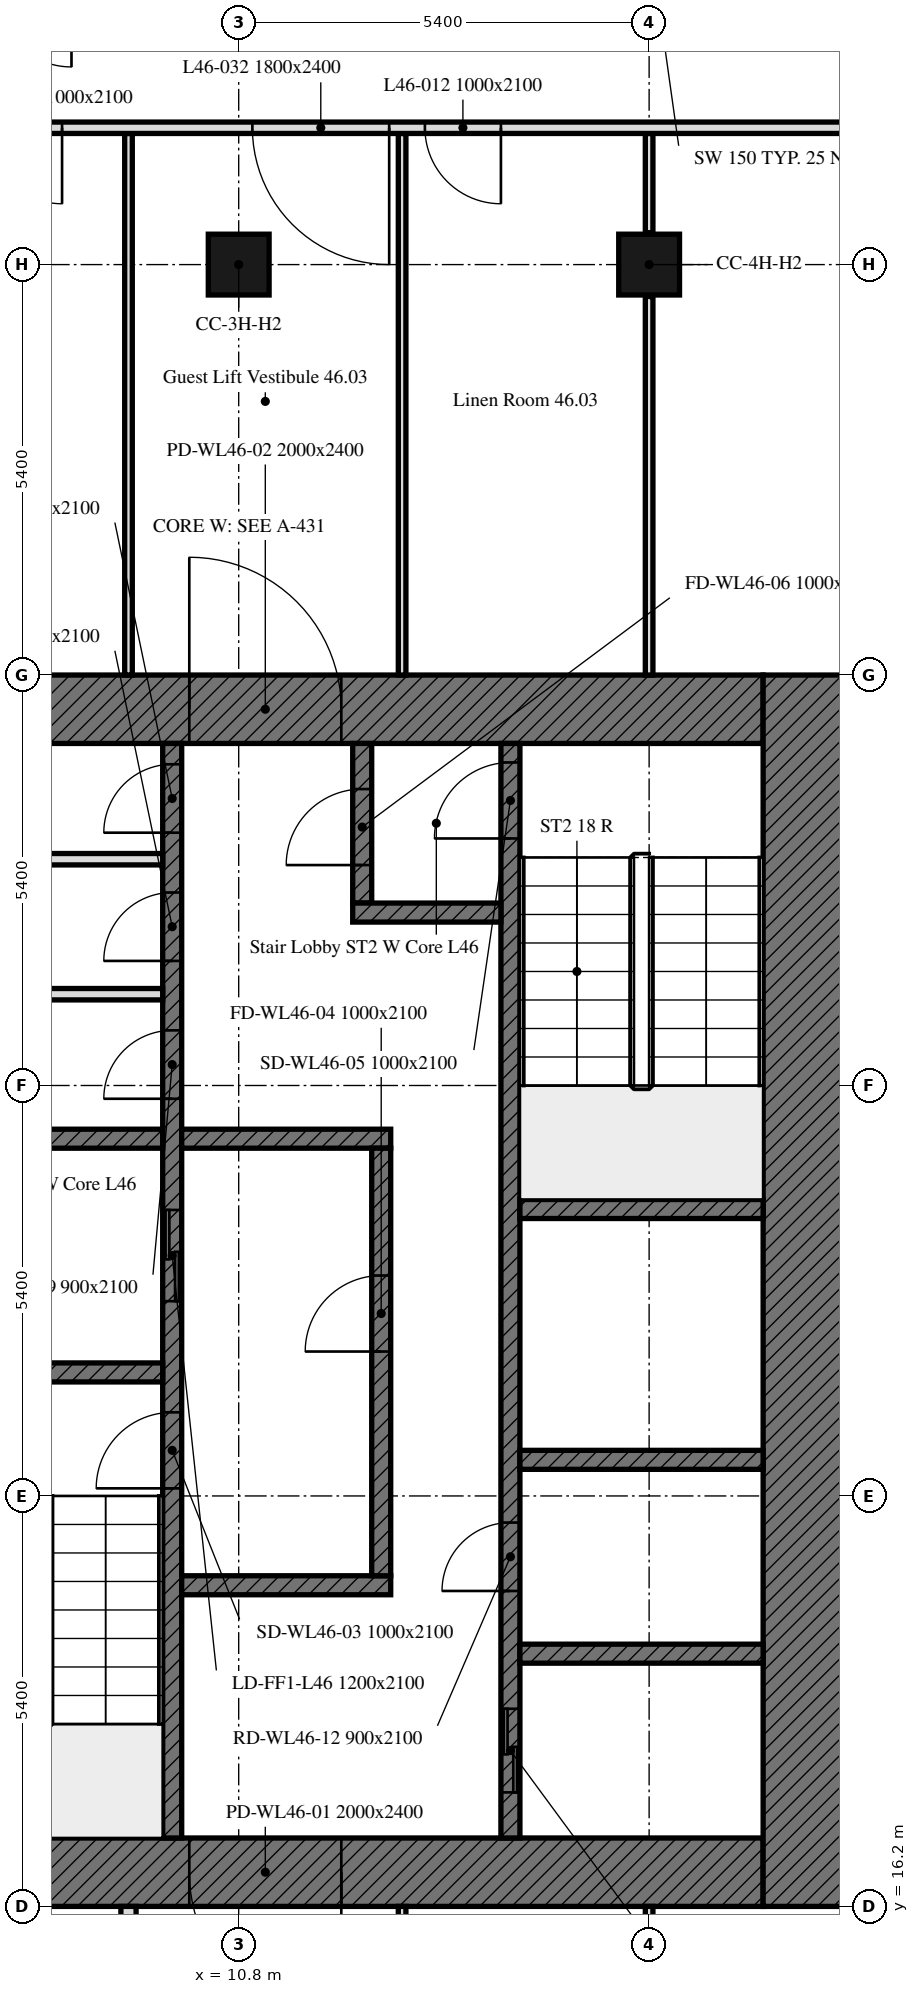
"""IFC4 building model, lengths in metres.
Left out: names, types, materials, properties, quantities, classifications, styles, units other than length and angle.
Written with IfcOpenShell. Run it as: python <this file> out.ifc"""

import sys

from ifc_helpers import new_model, si_unit, direction, frame, frame_2d, origin, origin_2d, place, context, subcontext, project, spatial, rectangle, extrude, element, fill, save


model = new_model("IFC4")
c1 = context("Model", 3, precision=1e-05, world=origin(), true_north=direction((0.0, 1.0)))
c2 = subcontext(c1, "Body", "Model", "MODEL_VIEW")
j1 = project(units=[si_unit("LENGTHUNIT", "METRE"), si_unit("PLANEANGLEUNIT", "RADIAN")], contexts=[c1])
p1 = place(None, origin())
s1 = spatial("IfcSite", under=j1, at=p1, CompositionType="ELEMENT")
p2 = place(p1, origin())
s2 = spatial("IfcBuilding", under=s1, at=p2, CompositionType="ELEMENT")
p3 = place(p2, frame((0.0, 0.0, 190.6)))
s3 = spatial("IfcBuildingStorey", under=s2, at=p3, CompositionType="ELEMENT", Elevation=190.6)
for number, where, z_axis, x_axis in (
    (1, (10.8, 37.8, 0.0), (0.0, 0.0, 1.0), (1.0, 0.0, 0.0)),
    (2, (16.2, 37.8, 0.0), (0.0, 0.0, 1.0), (1.0, 0.0, 0.0)),
):
    element("IfcColumn", number, at=place(p3, frame(where, z_axis=z_axis, x_axis=x_axis)), inside=s3, PredefinedType="COLUMN", context=c2, shape_type="SweptSolid", body=[
        extrude(rectangle(XDim=0.8, YDim=0.8, at=origin_2d()), origin(), (0.0, 0.0, 1.0), 3.0),
    ])
p4 = place(p3, frame((17.7, 16.65, 0.0), z_axis=(0.0, 0.0, 1.0), x_axis=(-1.0, 0.0, 0.0)))
e3 = element("IfcWall", 3, at=p4, inside=s3, PredefinedType="SOLIDWALL", context=c2, shape_type="SweptSolid", body=[
    extrude(rectangle(XDim=11.1, YDim=0.9, at=frame_2d((5.55, 0.0))), origin(), (0.0, 0.0, 1.0), 3.0),
])
p5 = place(p4, frame((5.55, 0.0, 0.0)))
e4 = element("IfcOpeningElement", 4, at=p5, cuts=e3, PredefinedType="OPENING", context=c2, shape_type="SweptSolid", body=[
    extrude(rectangle(XDim=2.0, YDim=2.4, at=frame_2d((1.0, 1.2))), frame((0.0, 0.45, 0.0), z_axis=(0.0, -1.0, 0.0), x_axis=(1.0, 0.0, 0.0)), (0.0, 0.0, 1.0), 0.9),
])
p6 = place(p3, frame((6.6, 31.95, 0.0), z_axis=(0.0, 0.0, 1.0), x_axis=(1.0, 0.0, 0.0)))
e5 = element("IfcWall", 5, at=p6, inside=s3, PredefinedType="SOLIDWALL", context=c2, shape_type="SweptSolid", body=[
    extrude(rectangle(XDim=11.1, YDim=0.9, at=frame_2d((5.55, 0.0))), origin(), (0.0, 0.0, 1.0), 3.0),
])
p7 = place(p6, frame((3.55, 0.0, 0.0)))
e6 = element("IfcOpeningElement", 6, at=p7, cuts=e5, PredefinedType="OPENING", context=c2, shape_type="SweptSolid", body=[
    extrude(rectangle(XDim=2.0, YDim=2.4, at=frame_2d((1.0, 1.2))), frame((0.0, 0.45, 0.0), z_axis=(0.0, -1.0, 0.0), x_axis=(1.0, 0.0, 0.0)), (0.0, 0.0, 1.0), 0.9),
])
p8 = place(p3, frame((18.3, 32.4, 0.0), z_axis=(0.0, 0.0, 1.0), x_axis=(0.0, -1.0, 0.0)))
e7 = element("IfcWall", 7, at=p8, inside=s3, PredefinedType="SOLIDWALL", context=c2, shape_type="SweptSolid", body=[
    extrude(rectangle(XDim=16.2, YDim=1.2, at=frame_2d((8.1, 0.0))), origin(), (0.0, 0.0, 1.0), 3.0),
])
p9 = place(p3, frame((9.925, 17.1, 0.0), z_axis=(0.0, 0.0, 1.0), x_axis=(0.0, 1.0, 0.0)))
e8 = element("IfcWall", 8, at=p9, inside=s3, PredefinedType="SOLIDWALL", context=c2, shape_type="SweptSolid", body=[
    extrude(rectangle(XDim=14.4, YDim=0.25, at=frame_2d((7.2, 0.0))), origin(), (0.0, 0.0, 1.0), 3.0),
])
p10 = place(p9, frame((4.6, 0.0, 0.0)))
e9 = element("IfcOpeningElement", 9, at=p10, cuts=e8, PredefinedType="OPENING", context=c2, shape_type="SweptSolid", body=[
    extrude(rectangle(XDim=1.0, YDim=2.1, at=frame_2d((0.5, 1.05))), frame((0.0, 0.125, 0.0), z_axis=(0.0, -1.0, 0.0), x_axis=(1.0, 0.0, 0.0)), (0.0, 0.0, 1.0), 0.25),
])
p11 = place(p9, frame((7.062, 0.0, 0.0)))
e10 = element("IfcOpeningElement", 10, at=p11, cuts=e8, PredefinedType="OPENING", context=c2, shape_type="SweptSolid", body=[
    extrude(rectangle(XDim=1.2, YDim=2.1, at=frame_2d((0.6, 1.05))), frame((0.0, 0.125, 0.0), z_axis=(0.0, -1.0, 0.0), x_axis=(1.0, 0.0, 0.0)), (0.0, 0.0, 1.0), 0.25),
])
p12 = place(p9, frame((9.726, 0.0, 0.0)))
e11 = element("IfcOpeningElement", 11, at=p12, cuts=e8, PredefinedType="OPENING", context=c2, shape_type="SweptSolid", body=[
    extrude(rectangle(XDim=0.9, YDim=2.1, at=frame_2d((0.45, 1.05))), frame((0.0, 0.125, 0.0), z_axis=(0.0, -1.0, 0.0), x_axis=(1.0, 0.0, 0.0)), (0.0, 0.0, 1.0), 0.25),
])
p13 = place(p9, frame((11.539, 0.0, 0.0)))
e12 = element("IfcOpeningElement", 12, at=p13, cuts=e8, PredefinedType="OPENING", context=c2, shape_type="SweptSolid", body=[
    extrude(rectangle(XDim=0.9, YDim=2.1, at=frame_2d((0.45, 1.05))), frame((0.0, 0.125, 0.0), z_axis=(0.0, -1.0, 0.0), x_axis=(1.0, 0.0, 0.0)), (0.0, 0.0, 1.0), 0.25),
])
p14 = place(p9, frame((13.226, 0.0, 0.0)))
e13 = element("IfcOpeningElement", 13, at=p14, cuts=e8, PredefinedType="OPENING", context=c2, shape_type="SweptSolid", body=[
    extrude(rectangle(XDim=0.9, YDim=2.1, at=frame_2d((0.45, 1.05))), frame((0.0, 0.125, 0.0), z_axis=(0.0, -1.0, 0.0), x_axis=(1.0, 0.0, 0.0)), (0.0, 0.0, 1.0), 0.25),
])
p15 = place(p3, frame((14.375, 17.1, 0.0), z_axis=(0.0, 0.0, 1.0), x_axis=(0.0, 1.0, 0.0)))
e14 = element("IfcWall", 14, at=p15, inside=s3, PredefinedType="SOLIDWALL", context=c2, shape_type="SweptSolid", body=[
    extrude(rectangle(XDim=14.4, YDim=0.25, at=frame_2d((7.2, 0.0))), origin(), (0.0, 0.0, 1.0), 3.0),
])
p16 = place(p15, frame((13.15, 0.0, 0.0)))
e15 = element("IfcOpeningElement", 15, at=p16, cuts=e14, PredefinedType="OPENING", context=c2, shape_type="SweptSolid", body=[
    extrude(rectangle(XDim=1.0, YDim=2.1, at=frame_2d((0.5, 1.05))), frame((0.0, 0.125, 0.0), z_axis=(0.0, -1.0, 0.0), x_axis=(1.0, 0.0, 0.0)), (0.0, 0.0, 1.0), 0.25),
])
p17 = place(p15, frame((0.6, 0.0, 0.0)))
e16 = element("IfcOpeningElement", 16, at=p17, cuts=e14, PredefinedType="OPENING", context=c2, shape_type="SweptSolid", body=[
    extrude(rectangle(XDim=1.1, YDim=2.1, at=frame_2d((0.55, 1.05))), frame((0.0, 0.125, 0.0), z_axis=(0.0, -1.0, 0.0), x_axis=(1.0, 0.0, 0.0)), (0.0, 0.0, 1.0), 0.25),
])
p18 = place(p15, frame((3.25, 0.0, 0.0)))
e17 = element("IfcOpeningElement", 17, at=p18, cuts=e14, PredefinedType="OPENING", context=c2, shape_type="SweptSolid", body=[
    extrude(rectangle(XDim=0.9, YDim=2.1, at=frame_2d((0.45, 1.05))), frame((0.0, 0.125, 0.0), z_axis=(0.0, -1.0, 0.0), x_axis=(1.0, 0.0, 0.0)), (0.0, 0.0, 1.0), 0.25),
])
for number, where, z_axis, x_axis in (
    (18, (6.6, 23.225, 0.0), (0.0, 0.0, 1.0), (1.0, 0.0, 0.0)),
    (19, (14.5, 25.375, 0.0), (0.0, 0.0, 1.0), (1.0, 0.0, 0.0)),
    (20, (14.5, 22.075, 0.0), (0.0, 0.0, 1.0), (1.0, 0.0, 0.0)),
    (21, (6.6, 26.3, 0.0), (0.0, 0.0, 1.0), (1.0, 0.0, 0.0)),
):
    element("IfcWall", number, at=place(p3, frame(where, z_axis=z_axis, x_axis=x_axis)), inside=s3, PredefinedType="SOLIDWALL", context=c2, shape_type="SweptSolid", body=[
        extrude(rectangle(XDim=3.2, YDim=0.25, at=frame_2d((1.6, 0.0))), origin(), (0.0, 0.0, 1.0), 3.0),
    ])
for number, where, z_axis, x_axis in (
    (22, (10.05, 26.3, 0.0), (0.0, 0.0, 1.0), (1.0, 0.0, 0.0)),
    (23, (10.05, 20.425, 0.0), (0.0, 0.0, 1.0), (1.0, 0.0, 0.0)),
):
    element("IfcWall", number, at=place(p3, frame(where, z_axis=z_axis, x_axis=x_axis)), inside=s3, PredefinedType="SOLIDWALL", context=c2, shape_type="SweptSolid", body=[
        extrude(rectangle(XDim=2.75, YDim=0.25, at=frame_2d((1.375, 0.0))), origin(), (0.0, 0.0, 1.0), 3.0),
    ])
p19 = place(p3, frame((12.425, 29.4, 0.0), z_axis=(0.0, 0.0, 1.0), x_axis=(0.0, 1.0, 0.0)))
e24 = element("IfcWall", 24, at=p19, inside=s3, PredefinedType="SOLIDWALL", context=c2, shape_type="SweptSolid", body=[
    extrude(rectangle(XDim=2.1, YDim=0.25, at=frame_2d((1.05, 0.0))), origin(), (0.0, 0.0, 1.0), 3.0),
])
p20 = place(p19, frame((0.5, 0.0, 0.0)))
e25 = element("IfcOpeningElement", 25, at=p20, cuts=e24, PredefinedType="OPENING", context=c2, shape_type="SweptSolid", body=[
    extrude(rectangle(XDim=1.0, YDim=2.1, at=frame_2d((0.5, 1.05))), frame((0.0, 0.125, 0.0), z_axis=(0.0, -1.0, 0.0), x_axis=(1.0, 0.0, 0.0)), (0.0, 0.0, 1.0), 0.25),
])
p21 = place(p3, frame((12.3, 29.275, 0.0), z_axis=(0.0, 0.0, 1.0), x_axis=(1.0, 0.0, 0.0)))
e26 = element("IfcWall", 26, at=p21, inside=s3, PredefinedType="SOLIDWALL", context=c2, shape_type="SweptSolid", body=[
    extrude(rectangle(XDim=1.95, YDim=0.25, at=frame_2d((0.975, 0.0))), origin(), (0.0, 0.0, 1.0), 3.0),
])
p22 = place(p3, frame((12.675, 20.55, 0.0), z_axis=(0.0, 0.0, 1.0), x_axis=(0.0, 1.0, 0.0)))
e27 = element("IfcWall", 27, at=p22, inside=s3, PredefinedType="SOLIDWALL", context=c2, shape_type="SweptSolid", body=[
    extrude(rectangle(XDim=5.625, YDim=0.25, at=frame_2d((2.812, 0.0))), origin(), (0.0, 0.0, 1.0), 3.0),
])
p23 = place(p22, frame((2.95, 0.0, 0.0)))
e28 = element("IfcOpeningElement", 28, at=p23, cuts=e27, PredefinedType="OPENING", context=c2, shape_type="SweptSolid", body=[
    extrude(rectangle(XDim=1.0, YDim=2.1, at=frame_2d((0.5, 1.05))), frame((0.0, 0.125, 0.0), z_axis=(0.0, -1.0, 0.0), x_axis=(1.0, 0.0, 0.0)), (0.0, 0.0, 1.0), 0.25),
])
p24 = place(p3, frame((14.5, 19.525, 0.0), z_axis=(0.0, 0.0, 1.0), x_axis=(1.0, 0.0, 0.0)))
e29 = element("IfcWall", 29, at=p24, inside=s3, PredefinedType="SOLIDWALL", context=c2, shape_type="SweptSolid", body=[
    extrude(rectangle(XDim=3.2, YDim=0.25, at=frame_2d((1.6, 0.0))), origin(), (0.0, 0.0, 1.0), 3.0),
])
for number, where, z_axis, x_axis in (
    (30, (6.6, 28.201, 0.0), (0.0, 0.0, 1.0), (1.0, 0.0, 0.0)),
    (31, (6.6, 29.977, 0.0), (0.0, 0.0, 1.0), (1.0, 0.0, 0.0)),
):
    element("IfcWall", number, at=place(p3, frame(where, z_axis=z_axis, x_axis=x_axis)), inside=s3, PredefinedType="PARTITIONING", context=c2, shape_type="SweptSolid", body=[
        extrude(rectangle(XDim=3.2, YDim=0.15, at=frame_2d((1.6, 0.0))), origin(), (0.0, 0.0, 1.0), 3.0),
    ])
p25 = place(p3, frame((16.2, 39.525, 0.0), z_axis=(0.0, 0.0, 1.0), x_axis=(0.0, -1.0, 0.0)))
e32 = element("IfcWall", 32, at=p25, inside=s3, PredefinedType="PARTITIONING", context=c2, shape_type="SweptSolid", body=[
    extrude(rectangle(XDim=1.305, YDim=0.1, at=frame_2d((0.652, 0.0))), origin(), (0.0, 0.0, 1.0), 2.4),
])
p26 = place(p3, frame((16.2, 37.38, 0.0), z_axis=(0.0, 0.0, 1.0), x_axis=(0.0, -1.0, 0.0)))
e33 = element("IfcWall", 33, at=p26, inside=s3, PredefinedType="PARTITIONING", context=c2, shape_type="SweptSolid", body=[
    extrude(rectangle(XDim=4.98, YDim=0.1, at=frame_2d((2.49, 0.0))), origin(), (0.0, 0.0, 1.0), 2.4),
])
for number, where, z_axis, x_axis in (
    (34, (9.35, 39.525, 0.0), (0.0, 0.0, 1.0), (0.0, -1.0, 0.0)),
    (35, (12.95, 32.4, 0.0), (0.0, 0.0, 1.0), (0.0, 1.0, 0.0)),
):
    element("IfcWall", number, at=place(p3, frame(where, z_axis=z_axis, x_axis=x_axis)), inside=s3, PredefinedType="PARTITIONING", context=c2, shape_type="SweptSolid", body=[
        extrude(rectangle(XDim=7.125, YDim=0.1, at=frame_2d((3.562, 0.0))), origin(), (0.0, 0.0, 1.0), 3.0),
    ])
p27 = place(p3, frame((43.275, 39.6, 0.0), z_axis=(0.0, 0.0, 1.0), x_axis=(-1.0, 0.0, 0.0)))
e36 = element("IfcWall", 36, at=p27, inside=s3, PredefinedType="PARTITIONING", context=c2, shape_type="SweptSolid", body=[
    extrude(rectangle(XDim=36.049, YDim=0.15, at=frame_2d((18.024, 0.0))), origin(), (0.0, 0.0, 1.0), 2.4),
])
p28 = place(p27, frame((18.475, 0.0, 0.0)))
e37 = element("IfcOpeningElement", 37, at=p28, cuts=e36, PredefinedType="OPENING", context=c2, shape_type="SweptSolid", body=[
    extrude(rectangle(XDim=1.0, YDim=2.1, at=frame_2d((0.5, 1.05))), frame((0.0, 0.075, 0.0), z_axis=(0.0, -1.0, 0.0), x_axis=(1.0, 0.0, 0.0)), (0.0, 0.0, 1.0), 0.15),
])
p29 = place(p27, frame((34.799, 0.0, 0.0)))
e38 = element("IfcOpeningElement", 38, at=p29, cuts=e36, PredefinedType="OPENING", context=c2, shape_type="SweptSolid", body=[
    extrude(rectangle(XDim=1.0, YDim=2.1, at=frame_2d((0.5, 1.05))), frame((0.0, 0.075, 0.0), z_axis=(0.0, -1.0, 0.0), x_axis=(1.0, 0.0, 0.0)), (0.0, 0.0, 1.0), 0.15),
])
p30 = place(p27, frame((7.925, 0.0, 0.0)))
e39 = element("IfcOpeningElement", 39, at=p30, cuts=e36, PredefinedType="OPENING", context=c2, shape_type="SweptSolid", body=[
    extrude(rectangle(XDim=1.0, YDim=2.1, at=frame_2d((0.5, 1.05))), frame((0.0, 0.075, 0.0), z_axis=(0.0, -1.0, 0.0), x_axis=(1.0, 0.0, 0.0)), (0.0, 0.0, 1.0), 0.15),
])
p31 = place(p27, frame((29.025, 0.0, 0.0)))
e40 = element("IfcOpeningElement", 40, at=p31, cuts=e36, PredefinedType="OPENING", context=c2, shape_type="SweptSolid", body=[
    extrude(rectangle(XDim=1.0, YDim=2.1, at=frame_2d((0.5, 1.05))), frame((0.0, 0.075, 0.0), z_axis=(0.0, -1.0, 0.0), x_axis=(1.0, 0.0, 0.0)), (0.0, 0.0, 1.0), 0.15),
])
p32 = place(p27, frame((30.495, 0.0, 0.0)))
e41 = element("IfcOpeningElement", 41, at=p32, cuts=e36, PredefinedType="OPENING", context=c2, shape_type="SweptSolid", body=[
    extrude(rectangle(XDim=1.8, YDim=2.4, at=frame_2d((0.9, 1.2))), frame((0.0, 0.075, 0.0), z_axis=(0.0, -1.0, 0.0), x_axis=(1.0, 0.0, 0.0)), (0.0, 0.0, 1.0), 0.15),
])
p33 = place(p27, frame((5.925, 0.0, 0.0)))
e42 = element("IfcOpeningElement", 42, at=p33, cuts=e36, PredefinedType="OPENING", context=c2, shape_type="SweptSolid", body=[
    extrude(rectangle(XDim=1.0, YDim=2.1, at=frame_2d((0.5, 1.05))), frame((0.0, 0.075, 0.0), z_axis=(0.0, -1.0, 0.0), x_axis=(1.0, 0.0, 0.0)), (0.0, 0.0, 1.0), 0.15),
])
p34 = place(p3, frame((16.2, 16.2, 0.0), z_axis=(0.0, 0.0, 1.0), x_axis=(0.0, -1.0, 0.0)))
e43 = element("IfcWall", 43, at=p34, inside=s3, PredefinedType="PARTITIONING", context=c2, shape_type="SweptSolid", body=[
    extrude(rectangle(XDim=2.625, YDim=0.1, at=frame_2d((1.312, 0.0))), origin(), (0.0, 0.0, 1.0), 3.0),
])
p35 = place(p3, frame((9.35, 16.2, 0.0), z_axis=(0.0, 0.0, 1.0), x_axis=(0.0, -1.0, 0.0)))
e44 = element("IfcWall", 44, at=p35, inside=s3, PredefinedType="PARTITIONING", context=c2, shape_type="SweptSolid", body=[
    extrude(rectangle(XDim=2.8, YDim=0.2, at=frame_2d((1.4, 0.0))), origin(), (0.0, 0.0, 1.0), 3.0),
])
p36 = place(p3, frame((12.95, 13.575, 0.0), z_axis=(0.0, 0.0, 1.0), x_axis=(0.0, 1.0, 0.0)))
e45 = element("IfcWall", 45, at=p36, inside=s3, PredefinedType="PARTITIONING", context=c2, shape_type="SweptSolid", body=[
    extrude(rectangle(XDim=2.625, YDim=0.1, at=frame_2d((1.312, 0.0))), origin(), (0.0, 0.0, 1.0), 3.0),
])
p37 = place(p5, origin())
e46 = element("IfcDoor", 46, at=p37, inside=s3, OperationType="DOUBLE_DOOR_SINGLE_SWING", PredefinedType="DOOR", context=c2, shape_type="SweptSolid", body=[
    extrude(rectangle(XDim=2.0, YDim=2.4, at=frame_2d((1.0, 1.2))), frame((0.0, 0.025, 0.0), z_axis=(0.0, -1.0, 0.0), x_axis=(1.0, 0.0, 0.0)), (0.0, 0.0, 1.0), 0.05),
])
fill(e4, e46)
p38 = place(p7, origin())
e47 = element("IfcDoor", 47, at=p38, inside=s3, OperationType="DOUBLE_DOOR_SINGLE_SWING", PredefinedType="DOOR", context=c2, shape_type="SweptSolid", body=[
    extrude(rectangle(XDim=2.0, YDim=2.4, at=frame_2d((1.0, 1.2))), frame((0.0, 0.025, 0.0), z_axis=(0.0, -1.0, 0.0), x_axis=(1.0, 0.0, 0.0)), (0.0, 0.0, 1.0), 0.05),
])
fill(e6, e47)
p39 = place(p10, origin())
e48 = element("IfcDoor", 48, at=p39, inside=s3, OperationType="SINGLE_SWING_LEFT", PredefinedType="DOOR", context=c2, shape_type="SweptSolid", body=[
    extrude(rectangle(XDim=1.0, YDim=2.1, at=frame_2d((0.5, 1.05))), frame((0.0, 0.025, 0.0), z_axis=(0.0, -1.0, 0.0), x_axis=(1.0, 0.0, 0.0)), (0.0, 0.0, 1.0), 0.05),
])
fill(e9, e48)
p40 = place(p23, origin())
e49 = element("IfcDoor", 49, at=p40, inside=s3, OperationType="SINGLE_SWING_LEFT", PredefinedType="DOOR", context=c2, shape_type="SweptSolid", body=[
    extrude(rectangle(XDim=1.0, YDim=2.1, at=frame_2d((0.5, 1.05))), frame((0.0, 0.025, 0.0), z_axis=(0.0, -1.0, 0.0), x_axis=(1.0, 0.0, 0.0)), (0.0, 0.0, 1.0), 0.05),
])
fill(e28, e49)
p41 = place(p16, origin())
e50 = element("IfcDoor", 50, at=p41, inside=s3, OperationType="SINGLE_SWING_LEFT", PredefinedType="DOOR", context=c2, shape_type="SweptSolid", body=[
    extrude(rectangle(XDim=1.0, YDim=2.1, at=frame_2d((0.5, 1.05))), frame((0.0, 0.025, 0.0), z_axis=(0.0, -1.0, 0.0), x_axis=(1.0, 0.0, 0.0)), (0.0, 0.0, 1.0), 0.05),
])
fill(e15, e50)
p42 = place(p20, origin())
e51 = element("IfcDoor", 51, at=p42, inside=s3, OperationType="SINGLE_SWING_LEFT", PredefinedType="DOOR", context=c2, shape_type="SweptSolid", body=[
    extrude(rectangle(XDim=1.0, YDim=2.1, at=frame_2d((0.5, 1.05))), frame((0.0, 0.025, 0.0), z_axis=(0.0, -1.0, 0.0), x_axis=(1.0, 0.0, 0.0)), (0.0, 0.0, 1.0), 0.05),
])
fill(e25, e51)
p43 = place(p11, origin())
e52 = element("IfcDoor", 52, at=p43, inside=s3, OperationType="DOUBLE_DOOR_SLIDING", PredefinedType="DOOR", context=c2, shape_type="SweptSolid", body=[
    extrude(rectangle(XDim=1.2, YDim=2.1, at=frame_2d((0.6, 1.05))), frame((0.0, 0.025, 0.0), z_axis=(0.0, -1.0, 0.0), x_axis=(1.0, 0.0, 0.0)), (0.0, 0.0, 1.0), 0.05),
])
fill(e10, e52)
p44 = place(p17, origin())
e53 = element("IfcDoor", 53, at=p44, inside=s3, OperationType="DOUBLE_DOOR_SLIDING", PredefinedType="DOOR", context=c2, shape_type="SweptSolid", body=[
    extrude(rectangle(XDim=1.1, YDim=2.1, at=frame_2d((0.55, 1.05))), frame((0.0, 0.025, 0.0), z_axis=(0.0, -1.0, 0.0), x_axis=(1.0, 0.0, 0.0)), (0.0, 0.0, 1.0), 0.05),
])
fill(e16, e53)
p45 = place(p12, origin())
e54 = element("IfcDoor", 54, at=p45, inside=s3, OperationType="SINGLE_SWING_LEFT", PredefinedType="DOOR", context=c2, shape_type="SweptSolid", body=[
    extrude(rectangle(XDim=0.9, YDim=2.1, at=frame_2d((0.45, 1.05))), frame((0.0, 0.025, 0.0), z_axis=(0.0, -1.0, 0.0), x_axis=(1.0, 0.0, 0.0)), (0.0, 0.0, 1.0), 0.05),
])
fill(e11, e54)
p46 = place(p13, origin())
e55 = element("IfcDoor", 55, at=p46, inside=s3, OperationType="SINGLE_SWING_LEFT", PredefinedType="DOOR", context=c2, shape_type="SweptSolid", body=[
    extrude(rectangle(XDim=0.9, YDim=2.1, at=frame_2d((0.45, 1.05))), frame((0.0, 0.025, 0.0), z_axis=(0.0, -1.0, 0.0), x_axis=(1.0, 0.0, 0.0)), (0.0, 0.0, 1.0), 0.05),
])
fill(e12, e55)
p47 = place(p14, origin())
e56 = element("IfcDoor", 56, at=p47, inside=s3, OperationType="SINGLE_SWING_LEFT", PredefinedType="DOOR", context=c2, shape_type="SweptSolid", body=[
    extrude(rectangle(XDim=0.9, YDim=2.1, at=frame_2d((0.45, 1.05))), frame((0.0, 0.025, 0.0), z_axis=(0.0, -1.0, 0.0), x_axis=(1.0, 0.0, 0.0)), (0.0, 0.0, 1.0), 0.05),
])
fill(e13, e56)
p48 = place(p18, origin())
e57 = element("IfcDoor", 57, at=p48, inside=s3, OperationType="SINGLE_SWING_LEFT", PredefinedType="DOOR", context=c2, shape_type="SweptSolid", body=[
    extrude(rectangle(XDim=0.9, YDim=2.1, at=frame_2d((0.45, 1.05))), frame((0.0, 0.025, 0.0), z_axis=(0.0, -1.0, 0.0), x_axis=(1.0, 0.0, 0.0)), (0.0, 0.0, 1.0), 0.05),
])
fill(e17, e57)
p49 = place(p29, origin())
e58 = element("IfcDoor", 58, at=p49, inside=s3, OperationType="SINGLE_SWING_LEFT", PredefinedType="DOOR", context=c2, shape_type="SweptSolid", body=[
    extrude(rectangle(XDim=1.0, YDim=2.1, at=frame_2d((0.5, 1.05))), frame((0.0, 0.025, 0.0), z_axis=(0.0, -1.0, 0.0), x_axis=(1.0, 0.0, 0.0)), (0.0, 0.0, 1.0), 0.05),
])
fill(e38, e58)
p50 = place(p31, origin())
e59 = element("IfcDoor", 59, at=p50, inside=s3, OperationType="SINGLE_SWING_RIGHT", PredefinedType="DOOR", context=c2, shape_type="SweptSolid", body=[
    extrude(rectangle(XDim=1.0, YDim=2.1, at=frame_2d((0.5, 1.05))), frame((0.0, 0.025, 0.0), z_axis=(0.0, -1.0, 0.0), x_axis=(1.0, 0.0, 0.0)), (0.0, 0.0, 1.0), 0.05),
])
fill(e40, e59)
p51 = place(p32, origin())
e60 = element("IfcDoor", 60, at=p51, inside=s3, OperationType="DOUBLE_DOOR_SINGLE_SWING", PredefinedType="DOOR", context=c2, shape_type="SweptSolid", body=[
    extrude(rectangle(XDim=1.8, YDim=2.4, at=frame_2d((0.9, 1.2))), frame((0.0, 0.025, 0.0), z_axis=(0.0, -1.0, 0.0), x_axis=(1.0, 0.0, 0.0)), (0.0, 0.0, 1.0), 0.05),
])
fill(e41, e60)
save(model, sys.argv[1])
